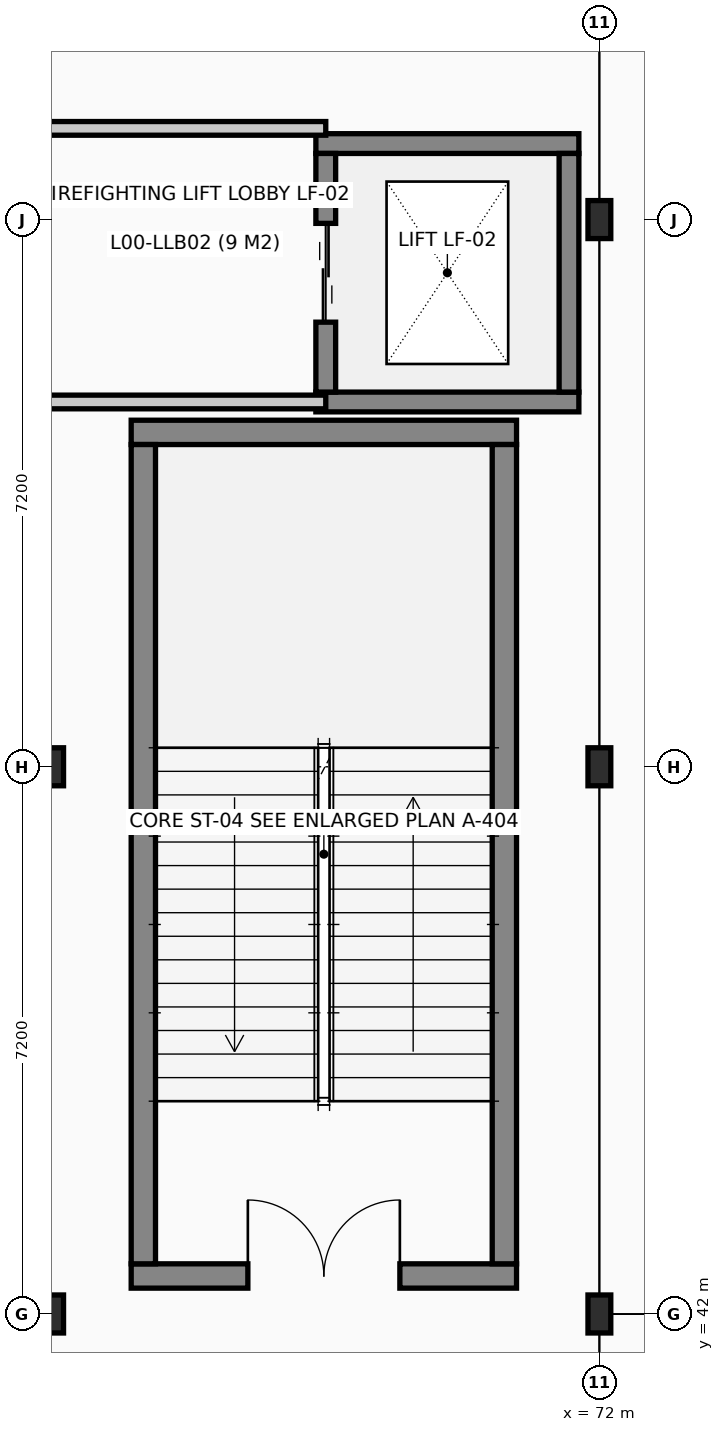
"""IFC4 building model, lengths in metres.
Left out: names, types, materials, properties, quantities, classifications, styles, units other than length and angle.
Written with IfcOpenShell. Run it as: python <this file> out.ifc"""

import sys

from ifc_helpers import new_model, si_unit, direction, frame, frame_2d, origin, origin_2d, place, context, subcontext, project, spatial, rectangle, i_section, extrude, element, fill, save


model = new_model("IFC4")
c1 = context("Model", 3, precision=1e-05, world=origin(), true_north=direction((0.0, 1.0)))
c2 = subcontext(c1, "Body", "Model", "MODEL_VIEW")
j1 = project(units=[si_unit("LENGTHUNIT", "METRE"), si_unit("PLANEANGLEUNIT", "RADIAN")], contexts=[c1])
p1 = place(None, origin())
s1 = spatial("IfcSite", under=j1, at=p1, CompositionType="ELEMENT")
p2 = place(p1, origin())
s2 = spatial("IfcBuilding", under=s1, at=p2, CompositionType="ELEMENT")
p3 = place(p2, origin())
s3 = spatial("IfcBuildingStorey", under=s2, at=p3, CompositionType="ELEMENT", Elevation=0.0)
for number, where, z_axis, x_axis in (
    (1, (64.8, 42.0, 0.0), (0.0, 0.0, 1.0), (1.0, 0.0, 0.0)),
    (2, (64.8, 49.2, 0.0), (0.0, 0.0, 1.0), (1.0, 0.0, 0.0)),
    (3, (72.0, 42.0, 0.0), (0.0, 0.0, 1.0), (1.0, 0.0, 0.0)),
    (4, (72.0, 49.2, 0.0), (0.0, 0.0, 1.0), (1.0, 0.0, 0.0)),
    (5, (72.0, 56.4, 0.0), (0.0, 0.0, 1.0), (1.0, 0.0, 0.0)),
):
    element("IfcColumn", number, at=place(p3, frame(where, z_axis=z_axis, x_axis=x_axis)), inside=s3, PredefinedType="COLUMN", context=c2, shape_type="SweptSolid", body=[
        extrude(i_section(OverallWidth=0.3, OverallDepth=0.5, WebThickness=0.014, FlangeThickness=0.028, at=origin_2d()), origin(), (0.0, 0.0, 1.0), 4.8),
    ])
p4 = place(p3, frame((65.84, 42.5, 0.0), z_axis=(0.0, 0.0, 1.0), x_axis=(1.0, 0.0, 0.0)))
e6 = element("IfcWall", 6, at=p4, inside=s3, PredefinedType="SHEAR", context=c2, shape_type="SweptSolid", body=[
    extrude(rectangle(XDim=5.07, YDim=0.32, at=frame_2d((2.535, 0.0))), origin(), (0.0, 0.0, 1.0), 4.58),
])
p5 = place(p4, frame((1.535, 0.0, 0.0)))
e7 = element("IfcOpeningElement", 7, at=p5, cuts=e6, PredefinedType="OPENING", context=c2, shape_type="SweptSolid", body=[
    extrude(rectangle(XDim=2.0, YDim=2.15, at=frame_2d((1.0, 1.075))), frame((0.0, 0.17, 0.0), z_axis=(0.0, -1.0, 0.0), x_axis=(1.0, 0.0, 0.0)), (0.0, 0.0, 1.0), 0.34),
])
p6 = place(p3, frame((65.84, 53.6, 0.0), z_axis=(0.0, 0.0, 1.0), x_axis=(1.0, 0.0, 0.0)))
e8 = element("IfcWall", 8, at=p6, inside=s3, PredefinedType="SHEAR", context=c2, shape_type="SweptSolid", body=[
    extrude(rectangle(XDim=5.07, YDim=0.32, at=frame_2d((2.535, 0.0))), origin(), (0.0, 0.0, 1.0), 4.58),
])
for number, where, z_axis, x_axis in (
    (9, (66.0, 42.66, 0.0), (0.0, 0.0, 1.0), (0.0, 1.0, 0.0)),
    (10, (70.75, 42.66, 0.0), (0.0, 0.0, 1.0), (0.0, 1.0, 0.0)),
):
    element("IfcWall", number, at=place(p3, frame(where, z_axis=z_axis, x_axis=x_axis)), inside=s3, PredefinedType="SHEAR", context=c2, shape_type="SweptSolid", body=[
        extrude(rectangle(XDim=10.78, YDim=0.32, at=frame_2d((5.39, 0.0))), origin(), (0.0, 0.0, 1.0), 4.58),
    ])
for number, where, z_axis, x_axis in (
    (11, (68.27, 54.0, 0.0), (0.0, 0.0, 1.0), (1.0, 0.0, 0.0)),
    (12, (68.27, 57.4, 0.0), (0.0, 0.0, 1.0), (1.0, 0.0, 0.0)),
):
    element("IfcWall", number, at=place(p3, frame(where, z_axis=z_axis, x_axis=x_axis)), inside=s3, PredefinedType="SHEAR", context=c2, shape_type="SweptSolid", body=[
        extrude(rectangle(XDim=3.46, YDim=0.26, at=frame_2d((1.73, 0.0))), origin(), (0.0, 0.0, 1.0), 4.58),
    ])
p7 = place(p3, frame((68.4, 54.13, 0.0), z_axis=(0.0, 0.0, 1.0), x_axis=(0.0, 1.0, 0.0)))
e13 = element("IfcWall", 13, at=p7, inside=s3, PredefinedType="SHEAR", context=c2, shape_type="SweptSolid", body=[
    extrude(rectangle(XDim=3.14, YDim=0.26, at=frame_2d((1.57, 0.0))), origin(), (0.0, 0.0, 1.0), 4.58),
])
p8 = place(p7, frame((0.92, 0.0, 0.0)))
e14 = element("IfcOpeningElement", 14, at=p8, cuts=e13, PredefinedType="OPENING", context=c2, shape_type="SweptSolid", body=[
    extrude(rectangle(XDim=1.3, YDim=2.2, at=frame_2d((0.65, 1.1))), frame((0.0, 0.14, 0.0), z_axis=(0.0, -1.0, 0.0), x_axis=(1.0, 0.0, 0.0)), (0.0, 0.0, 1.0), 0.28),
])
p9 = place(p3, frame((71.6, 54.13, 0.0), z_axis=(0.0, 0.0, 1.0), x_axis=(0.0, 1.0, 0.0)))
e15 = element("IfcWall", 15, at=p9, inside=s3, PredefinedType="SHEAR", context=c2, shape_type="SweptSolid", body=[
    extrude(rectangle(XDim=3.14, YDim=0.26, at=frame_2d((1.57, 0.0))), origin(), (0.0, 0.0, 1.0), 4.58),
])
for number, where, z_axis, x_axis in (
    (16, (63.4, 54.0, 0.0), (0.0, 0.0, 1.0), (1.0, 0.0, 0.0)),
    (17, (63.4, 57.6, 0.0), (0.0, 0.0, 1.0), (1.0, 0.0, 0.0)),
):
    element("IfcWall", number, at=place(p3, frame(where, z_axis=z_axis, x_axis=x_axis)), inside=s3, PredefinedType="PARTITIONING", context=c2, shape_type="SweptSolid", body=[
        extrude(rectangle(XDim=5.0, YDim=0.18, at=frame_2d((2.5, 0.0))), origin(), (0.0, 0.0, 1.0), 4.565),
    ])
p10 = place(p5, origin())
e18 = element("IfcDoor", 18, at=p10, inside=s3, OperationType="DOUBLE_DOOR_SINGLE_SWING", PredefinedType="DOOR", context=c2, shape_type="SweptSolid", body=[
    extrude(rectangle(XDim=2.0, YDim=2.15, at=frame_2d((1.0, 1.075))), frame((0.0, 0.025, 0.0), z_axis=(0.0, -1.0, 0.0), x_axis=(1.0, 0.0, 0.0)), (0.0, 0.0, 1.0), 0.05),
])
fill(e7, e18)
p11 = place(p8, origin())
e19 = element("IfcDoor", 19, at=p11, inside=s3, OperationType="DOUBLE_DOOR_SLIDING", PredefinedType="DOOR", context=c2, shape_type="SweptSolid", body=[
    extrude(rectangle(XDim=1.3, YDim=2.2, at=frame_2d((0.65, 1.1))), frame((0.0, 0.025, 0.0), z_axis=(0.0, -1.0, 0.0), x_axis=(1.0, 0.0, 0.0)), (0.0, 0.0, 1.0), 0.05),
])
fill(e14, e19)
save(model, sys.argv[1])
